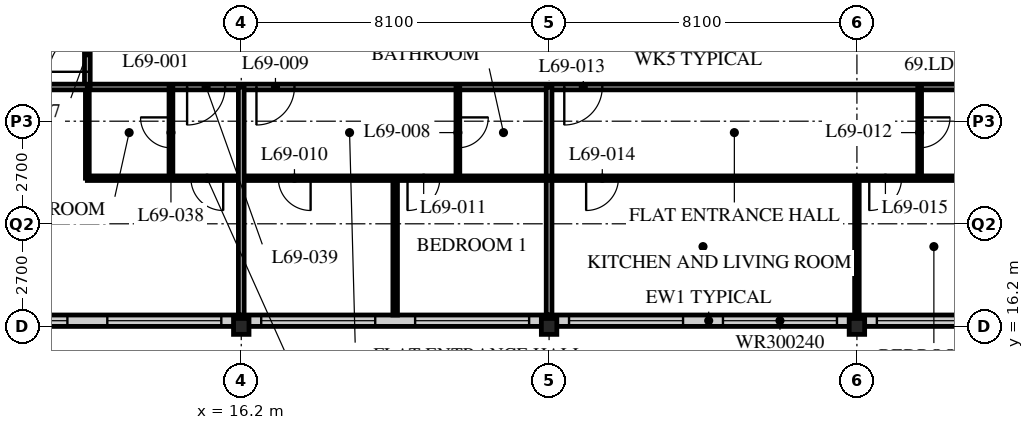
"""IFC4 building model, lengths in metres.
Left out: names, types, materials, properties, quantities, classifications, styles, units other than length and angle.
Written with IfcOpenShell. Run it as: python <this file> out.ifc"""

import sys

from ifc_helpers import new_model, si_unit, direction, frame, frame_2d, origin, origin_2d, place, context, subcontext, project, spatial, rectangle, i_section, extrude, element, fill, save


model = new_model("IFC4")
c1 = context("Model", 3, precision=1e-05, world=origin(), true_north=direction((0.0, 1.0)))
c2 = subcontext(c1, "Body", "Model", "MODEL_VIEW")
j1 = project(units=[si_unit("LENGTHUNIT", "METRE"), si_unit("PLANEANGLEUNIT", "RADIAN")], contexts=[c1])
p1 = place(None, origin())
s1 = spatial("IfcSite", under=j1, at=p1, CompositionType="ELEMENT")
p2 = place(p1, origin())
s2 = spatial("IfcBuilding", under=s1, at=p2, CompositionType="ELEMENT")
p3 = place(p2, frame((0.0, 0.0, 269.7)))
s3 = spatial("IfcBuildingStorey", under=s2, at=p3, CompositionType="ELEMENT", Elevation=269.7)
for number, where, z_axis, x_axis in (
    (1, (16.2, 16.2, 0.0), (0.0, 0.0, 1.0), (1.0, 0.0, 0.0)),
    (2, (24.3, 16.2, 0.0), (0.0, 0.0, 1.0), (1.0, 0.0, 0.0)),
    (3, (32.4, 16.2, 0.0), (0.0, 0.0, 1.0), (1.0, 0.0, 0.0)),
):
    element("IfcColumn", number, at=place(p3, frame(where, z_axis=z_axis, x_axis=x_axis)), inside=s3, PredefinedType="COLUMN", context=c2, shape_type="SweptSolid", body=[
        extrude(i_section(OverallWidth=0.407, OverallDepth=0.419, WebThickness=0.031, FlangeThickness=0.049, FilletRadius=0.015, at=origin_2d()), origin(), (0.0, 0.0, 1.0), 3.9),
    ])
p4 = place(p3, frame((8.4, 16.35, 0.0), z_axis=(0.0, 0.0, 1.0), x_axis=(1.0, 0.0, 0.0)))
e4 = element("IfcWall", 4, at=p4, inside=s3, PredefinedType="SOLIDWALL", context=c2, shape_type="SweptSolid", body=[
    extrude(rectangle(XDim=40.2, YDim=0.3, at=frame_2d((20.1, 0.0))), origin(), (0.0, 0.0, 1.0), 3.69),
])
p5 = place(p4, frame((0.225, 0.0, 0.6)))
e5 = element("IfcOpeningElement", 5, at=p5, cuts=e4, PredefinedType="OPENING", context=c2, shape_type="SweptSolid", body=[
    extrude(rectangle(XDim=3.0, YDim=2.4, at=frame_2d((1.5, 1.2))), frame((0.0, 0.16, 0.0), z_axis=(0.0, -1.0, 0.0), x_axis=(1.0, 0.0, 0.0)), (0.0, 0.0, 1.0), 0.32),
])
p6 = place(p4, frame((4.275, 0.0, 0.6)))
e6 = element("IfcOpeningElement", 6, at=p6, cuts=e4, PredefinedType="OPENING", context=c2, shape_type="SweptSolid", body=[
    extrude(rectangle(XDim=3.0, YDim=2.4, at=frame_2d((1.5, 1.2))), frame((0.0, 0.16, 0.0), z_axis=(0.0, -1.0, 0.0), x_axis=(1.0, 0.0, 0.0)), (0.0, 0.0, 1.0), 0.32),
])
p7 = place(p4, frame((8.325, 0.0, 0.6)))
e7 = element("IfcOpeningElement", 7, at=p7, cuts=e4, PredefinedType="OPENING", context=c2, shape_type="SweptSolid", body=[
    extrude(rectangle(XDim=3.0, YDim=2.4, at=frame_2d((1.5, 1.2))), frame((0.0, 0.16, 0.0), z_axis=(0.0, -1.0, 0.0), x_axis=(1.0, 0.0, 0.0)), (0.0, 0.0, 1.0), 0.32),
])
p8 = place(p4, frame((12.375, 0.0, 0.6)))
e8 = element("IfcOpeningElement", 8, at=p8, cuts=e4, PredefinedType="OPENING", context=c2, shape_type="SweptSolid", body=[
    extrude(rectangle(XDim=3.0, YDim=2.4, at=frame_2d((1.5, 1.2))), frame((0.0, 0.16, 0.0), z_axis=(0.0, -1.0, 0.0), x_axis=(1.0, 0.0, 0.0)), (0.0, 0.0, 1.0), 0.32),
])
p9 = place(p4, frame((16.425, 0.0, 0.6)))
e9 = element("IfcOpeningElement", 9, at=p9, cuts=e4, PredefinedType="OPENING", context=c2, shape_type="SweptSolid", body=[
    extrude(rectangle(XDim=3.0, YDim=2.4, at=frame_2d((1.5, 1.2))), frame((0.0, 0.16, 0.0), z_axis=(0.0, -1.0, 0.0), x_axis=(1.0, 0.0, 0.0)), (0.0, 0.0, 1.0), 0.32),
])
p10 = place(p4, frame((20.475, 0.0, 0.6)))
e10 = element("IfcOpeningElement", 10, at=p10, cuts=e4, PredefinedType="OPENING", context=c2, shape_type="SweptSolid", body=[
    extrude(rectangle(XDim=3.0, YDim=2.4, at=frame_2d((1.5, 1.2))), frame((0.0, 0.16, 0.0), z_axis=(0.0, -1.0, 0.0), x_axis=(1.0, 0.0, 0.0)), (0.0, 0.0, 1.0), 0.32),
])
p11 = place(p4, frame((24.525, 0.0, 0.6)))
e11 = element("IfcOpeningElement", 11, at=p11, cuts=e4, PredefinedType="OPENING", context=c2, shape_type="SweptSolid", body=[
    extrude(rectangle(XDim=3.0, YDim=2.4, at=frame_2d((1.5, 1.2))), frame((0.0, 0.16, 0.0), z_axis=(0.0, -1.0, 0.0), x_axis=(1.0, 0.0, 0.0)), (0.0, 0.0, 1.0), 0.32),
])
p12 = place(p4, frame((28.575, 0.0, 0.6)))
e12 = element("IfcOpeningElement", 12, at=p12, cuts=e4, PredefinedType="OPENING", context=c2, shape_type="SweptSolid", body=[
    extrude(rectangle(XDim=3.0, YDim=2.4, at=frame_2d((1.5, 1.2))), frame((0.0, 0.16, 0.0), z_axis=(0.0, -1.0, 0.0), x_axis=(1.0, 0.0, 0.0)), (0.0, 0.0, 1.0), 0.32),
])
p13 = place(p4, frame((32.625, 0.0, 0.6)))
e13 = element("IfcOpeningElement", 13, at=p13, cuts=e4, PredefinedType="OPENING", context=c2, shape_type="SweptSolid", body=[
    extrude(rectangle(XDim=3.0, YDim=2.4, at=frame_2d((1.5, 1.2))), frame((0.0, 0.16, 0.0), z_axis=(0.0, -1.0, 0.0), x_axis=(1.0, 0.0, 0.0)), (0.0, 0.0, 1.0), 0.32),
])
p14 = place(p4, frame((36.675, 0.0, 0.6)))
e14 = element("IfcOpeningElement", 14, at=p14, cuts=e4, PredefinedType="OPENING", context=c2, shape_type="SweptSolid", body=[
    extrude(rectangle(XDim=3.0, YDim=2.4, at=frame_2d((1.5, 1.2))), frame((0.0, 0.16, 0.0), z_axis=(0.0, -1.0, 0.0), x_axis=(1.0, 0.0, 0.0)), (0.0, 0.0, 1.0), 0.32),
])
p15 = place(p3, frame((12.15, 22.5, 0.0), z_axis=(0.0, 0.0, 1.0), x_axis=(1.0, 0.0, 0.0)))
e15 = element("IfcWall", 15, at=p15, inside=s3, PredefinedType="PARTITIONING", context=c2, shape_type="SweptSolid", body=[
    extrude(rectangle(XDim=24.3, YDim=0.15, at=frame_2d((12.15, 0.0))), origin(), (0.0, 0.0, 1.0), 3.69),
])
p16 = place(p15, frame((4.45, 0.0, 0.0)))
e16 = element("IfcOpeningElement", 16, at=p16, cuts=e15, PredefinedType="OPENING", context=c2, shape_type="SweptSolid", body=[
    extrude(rectangle(XDim=1.0, YDim=2.1, at=frame_2d((0.5, 1.05))), frame((0.0, 0.085, 0.0), z_axis=(0.0, -1.0, 0.0), x_axis=(1.0, 0.0, 0.0)), (0.0, 0.0, 1.0), 0.17),
])
p17 = place(p15, frame((12.55, 0.0, 0.0)))
e17 = element("IfcOpeningElement", 17, at=p17, cuts=e15, PredefinedType="OPENING", context=c2, shape_type="SweptSolid", body=[
    extrude(rectangle(XDim=1.0, YDim=2.1, at=frame_2d((0.5, 1.05))), frame((0.0, 0.085, 0.0), z_axis=(0.0, -1.0, 0.0), x_axis=(1.0, 0.0, 0.0)), (0.0, 0.0, 1.0), 0.17),
])
p18 = place(p15, frame((2.625, 0.0, 0.0)))
e18 = element("IfcOpeningElement", 18, at=p18, cuts=e15, PredefinedType="OPENING", context=c2, shape_type="SweptSolid", body=[
    extrude(rectangle(XDim=1.0, YDim=2.1, at=frame_2d((0.5, 1.05))), frame((0.0, 0.085, 0.0), z_axis=(0.0, -1.0, 0.0), x_axis=(1.0, 0.0, 0.0)), (0.0, 0.0, 1.0), 0.17),
])
p19 = place(p3, frame((12.15, 22.5, 0.0), z_axis=(0.0, 0.0, 1.0), x_axis=(0.0, 1.0, 0.0)))
e19 = element("IfcWall", 19, at=p19, inside=s3, PredefinedType="PARTITIONING", context=c2, shape_type="SweptSolid", body=[
    extrude(rectangle(XDim=30.15, YDim=0.15, at=frame_2d((15.075, 0.0))), origin(), (0.0, 0.0, 1.0), 3.69),
])
p20 = place(p19, frame((0.4, 0.0, 0.0)))
e20 = element("IfcOpeningElement", 20, at=p20, cuts=e19, PredefinedType="OPENING", context=c2, shape_type="SweptSolid", body=[
    extrude(rectangle(XDim=1.0, YDim=2.1, at=frame_2d((0.5, 1.05))), frame((0.0, 0.085, 0.0), z_axis=(0.0, -1.0, 0.0), x_axis=(1.0, 0.0, 0.0)), (0.0, 0.0, 1.0), 0.17),
])
p21 = place(p19, frame((18.4, 0.0, 0.0)))
e21 = element("IfcOpeningElement", 21, at=p21, cuts=e19, PredefinedType="OPENING", context=c2, shape_type="SweptSolid", body=[
    extrude(rectangle(XDim=1.0, YDim=2.1, at=frame_2d((0.5, 1.05))), frame((0.0, 0.085, 0.0), z_axis=(0.0, -1.0, 0.0), x_axis=(1.0, 0.0, 0.0)), (0.0, 0.0, 1.0), 0.17),
])
p22 = place(p19, frame((28.45, 0.0, 0.0)))
e22 = element("IfcOpeningElement", 22, at=p22, cuts=e19, PredefinedType="OPENING", context=c2, shape_type="SweptSolid", body=[
    extrude(rectangle(XDim=1.0, YDim=2.1, at=frame_2d((0.5, 1.05))), frame((0.0, 0.085, 0.0), z_axis=(0.0, -1.0, 0.0), x_axis=(1.0, 0.0, 0.0)), (0.0, 0.0, 1.0), 0.17),
])
p23 = place(p3, frame((21.9, 22.5, 0.0), z_axis=(0.0, 0.0, 1.0), x_axis=(0.0, -1.0, 0.0)))
e23 = element("IfcWall", 23, at=p23, inside=s3, PredefinedType="PARTITIONING", context=c2, shape_type="SweptSolid", body=[
    extrude(rectangle(XDim=2.4, YDim=0.1, at=frame_2d((1.2, 0.0))), origin(), (0.0, 0.0, 1.0), 3.69),
])
p24 = place(p23, frame((0.8, 0.0, 0.0)))
e24 = element("IfcOpeningElement", 24, at=p24, cuts=e23, PredefinedType="OPENING", context=c2, shape_type="SweptSolid", body=[
    extrude(rectangle(XDim=0.8, YDim=2.1, at=frame_2d((0.4, 1.05))), frame((0.0, 0.06, 0.0), z_axis=(0.0, -1.0, 0.0), x_axis=(1.0, 0.0, 0.0)), (0.0, 0.0, 1.0), 0.12),
])
p25 = place(p3, frame((20.25, 20.1, 0.0), z_axis=(0.0, 0.0, 1.0), x_axis=(0.0, -1.0, 0.0)))
e25 = element("IfcWall", 25, at=p25, inside=s3, PredefinedType="PARTITIONING", context=c2, shape_type="SweptSolid", body=[
    extrude(rectangle(XDim=3.6, YDim=0.12, at=frame_2d((1.8, 0.0))), origin(), (0.0, 0.0, 1.0), 3.69),
])
p26 = place(p3, frame((24.3, 22.5, 0.0), z_axis=(0.0, 0.0, 1.0), x_axis=(0.0, -1.0, 0.0)))
e26 = element("IfcWall", 26, at=p26, inside=s3, PredefinedType="PARTITIONING", context=c2, shape_type="SweptSolid", body=[
    extrude(rectangle(XDim=6.0, YDim=0.15, at=frame_2d((3.0, 0.0))), origin(), (0.0, 0.0, 1.0), 3.078),
])
p27 = place(p3, frame((34.05, 22.5, 0.0), z_axis=(0.0, 0.0, 1.0), x_axis=(0.0, -1.0, 0.0)))
e27 = element("IfcWall", 27, at=p27, inside=s3, PredefinedType="PARTITIONING", context=c2, shape_type="SweptSolid", body=[
    extrude(rectangle(XDim=2.4, YDim=0.1, at=frame_2d((1.2, 0.0))), origin(), (0.0, 0.0, 1.0), 3.69),
])
p28 = place(p27, frame((0.8, 0.0, 0.0)))
e28 = element("IfcOpeningElement", 28, at=p28, cuts=e27, PredefinedType="OPENING", context=c2, shape_type="SweptSolid", body=[
    extrude(rectangle(XDim=0.8, YDim=2.1, at=frame_2d((0.4, 1.05))), frame((0.0, 0.06, 0.0), z_axis=(0.0, -1.0, 0.0), x_axis=(1.0, 0.0, 0.0)), (0.0, 0.0, 1.0), 0.12),
])
p29 = place(p3, frame((32.4, 20.1, 0.0), z_axis=(0.0, 0.0, 1.0), x_axis=(0.0, -1.0, 0.0)))
e29 = element("IfcWall", 29, at=p29, inside=s3, PredefinedType="PARTITIONING", context=c2, shape_type="SweptSolid", body=[
    extrude(rectangle(XDim=3.6, YDim=0.12, at=frame_2d((1.8, 0.0))), origin(), (0.0, 0.0, 1.0), 3.078),
])
p30 = place(p3, frame((12.15, 20.1, 0.0), z_axis=(0.0, 0.0, 1.0), x_axis=(1.0, 0.0, 0.0)))
e30 = element("IfcWall", 30, at=p30, inside=s3, PredefinedType="PARTITIONING", context=c2, shape_type="SweptSolid", body=[
    extrude(rectangle(XDim=24.3, YDim=0.12, at=frame_2d((12.15, 0.0))), origin(), (0.0, 0.0, 1.0), 3.69),
])
p31 = place(p30, frame((5.025, 0.0, 0.0)))
e31 = element("IfcOpeningElement", 31, at=p31, cuts=e30, PredefinedType="OPENING", context=c2, shape_type="SweptSolid", body=[
    extrude(rectangle(XDim=0.85, YDim=2.1, at=frame_2d((0.425, 1.05))), frame((0.0, 0.07, 0.0), z_axis=(0.0, -1.0, 0.0), x_axis=(1.0, 0.0, 0.0)), (0.0, 0.0, 1.0), 0.14),
])
p32 = place(p30, frame((8.425, 0.0, 0.0)))
e32 = element("IfcOpeningElement", 32, at=p32, cuts=e30, PredefinedType="OPENING", context=c2, shape_type="SweptSolid", body=[
    extrude(rectangle(XDim=0.85, YDim=2.1, at=frame_2d((0.425, 1.05))), frame((0.0, 0.07, 0.0), z_axis=(0.0, -1.0, 0.0), x_axis=(1.0, 0.0, 0.0)), (0.0, 0.0, 1.0), 0.14),
])
p33 = place(p30, frame((13.125, 0.0, 0.0)))
e33 = element("IfcOpeningElement", 33, at=p33, cuts=e30, PredefinedType="OPENING", context=c2, shape_type="SweptSolid", body=[
    extrude(rectangle(XDim=0.85, YDim=2.1, at=frame_2d((0.425, 1.05))), frame((0.0, 0.07, 0.0), z_axis=(0.0, -1.0, 0.0), x_axis=(1.0, 0.0, 0.0)), (0.0, 0.0, 1.0), 0.14),
])
p34 = place(p30, frame((20.575, 0.0, 0.0)))
e34 = element("IfcOpeningElement", 34, at=p34, cuts=e30, PredefinedType="OPENING", context=c2, shape_type="SweptSolid", body=[
    extrude(rectangle(XDim=0.85, YDim=2.1, at=frame_2d((0.425, 1.05))), frame((0.0, 0.07, 0.0), z_axis=(0.0, -1.0, 0.0), x_axis=(1.0, 0.0, 0.0)), (0.0, 0.0, 1.0), 0.14),
])
p35 = place(p30, frame((2.725, 0.0, 0.0)))
e35 = element("IfcOpeningElement", 35, at=p35, cuts=e30, PredefinedType="OPENING", context=c2, shape_type="SweptSolid", body=[
    extrude(rectangle(XDim=0.85, YDim=2.1, at=frame_2d((0.425, 1.05))), frame((0.0, 0.07, 0.0), z_axis=(0.0, -1.0, 0.0), x_axis=(1.0, 0.0, 0.0)), (0.0, 0.0, 1.0), 0.14),
])
p36 = place(p3, frame((14.35, 22.5, 0.0), z_axis=(0.0, 0.0, 1.0), x_axis=(0.0, -1.0, 0.0)))
e36 = element("IfcWall", 36, at=p36, inside=s3, PredefinedType="PARTITIONING", context=c2, shape_type="SweptSolid", body=[
    extrude(rectangle(XDim=2.4, YDim=0.1, at=frame_2d((1.2, 0.0))), origin(), (0.0, 0.0, 1.0), 3.69),
])
p37 = place(p36, frame((0.8, 0.0, 0.0)))
e37 = element("IfcOpeningElement", 37, at=p37, cuts=e36, PredefinedType="OPENING", context=c2, shape_type="SweptSolid", body=[
    extrude(rectangle(XDim=0.8, YDim=2.1, at=frame_2d((0.4, 1.05))), frame((0.0, 0.06, 0.0), z_axis=(0.0, -1.0, 0.0), x_axis=(1.0, 0.0, 0.0)), (0.0, 0.0, 1.0), 0.12),
])
p38 = place(p3, frame((12.15, 22.5, 0.0), z_axis=(0.0, 0.0, 1.0), x_axis=(0.0, -1.0, 0.0)))
e38 = element("IfcWall", 38, at=p38, inside=s3, PredefinedType="PARTITIONING", context=c2, shape_type="SweptSolid", body=[
    extrude(rectangle(XDim=2.4, YDim=0.1, at=frame_2d((1.2, 0.0))), origin(), (0.0, 0.0, 1.0), 3.69),
])
p39 = place(p3, frame((4.35, 22.5, 0.0), z_axis=(0.0, 0.0, 1.0), x_axis=(1.0, 0.0, 0.0)))
e39 = element("IfcWall", 39, at=p39, inside=s3, PredefinedType="PARTITIONING", context=c2, shape_type="SweptSolid", body=[
    extrude(rectangle(XDim=7.8, YDim=0.15, at=frame_2d((3.9, 0.0))), origin(), (0.0, 0.0, 1.0), 3.69),
])
p40 = place(p3, frame((16.2, 22.5, 0.0), z_axis=(0.0, 0.0, 1.0), x_axis=(0.0, -1.0, 0.0)))
e40 = element("IfcWall", 40, at=p40, inside=s3, PredefinedType="PARTITIONING", context=c2, shape_type="SweptSolid", body=[
    extrude(rectangle(XDim=6.0, YDim=0.15, at=frame_2d((3.0, 0.0))), origin(), (0.0, 0.0, 1.0), 3.078),
])
p41 = place(p5, origin())
e41 = element("IfcWindow", 41, at=p41, inside=s3, PartitioningType="SINGLE_PANEL", PredefinedType="WINDOW", context=c2, shape_type="SweptSolid", body=[
    extrude(rectangle(XDim=3.0, YDim=2.4, at=frame_2d((1.5, 1.2))), frame((0.0, 0.03, 0.0), z_axis=(0.0, -1.0, 0.0), x_axis=(1.0, 0.0, 0.0)), (0.0, 0.0, 1.0), 0.06),
])
fill(e5, e41)
p42 = place(p6, origin())
e42 = element("IfcWindow", 42, at=p42, inside=s3, PartitioningType="SINGLE_PANEL", PredefinedType="WINDOW", context=c2, shape_type="SweptSolid", body=[
    extrude(rectangle(XDim=3.0, YDim=2.4, at=frame_2d((1.5, 1.2))), frame((0.0, 0.03, 0.0), z_axis=(0.0, -1.0, 0.0), x_axis=(1.0, 0.0, 0.0)), (0.0, 0.0, 1.0), 0.06),
])
fill(e6, e42)
p43 = place(p7, origin())
e43 = element("IfcWindow", 43, at=p43, inside=s3, PartitioningType="SINGLE_PANEL", PredefinedType="WINDOW", context=c2, shape_type="SweptSolid", body=[
    extrude(rectangle(XDim=3.0, YDim=2.4, at=frame_2d((1.5, 1.2))), frame((0.0, 0.03, 0.0), z_axis=(0.0, -1.0, 0.0), x_axis=(1.0, 0.0, 0.0)), (0.0, 0.0, 1.0), 0.06),
])
fill(e7, e43)
p44 = place(p8, origin())
e44 = element("IfcWindow", 44, at=p44, inside=s3, PartitioningType="SINGLE_PANEL", PredefinedType="WINDOW", context=c2, shape_type="SweptSolid", body=[
    extrude(rectangle(XDim=3.0, YDim=2.4, at=frame_2d((1.5, 1.2))), frame((0.0, 0.03, 0.0), z_axis=(0.0, -1.0, 0.0), x_axis=(1.0, 0.0, 0.0)), (0.0, 0.0, 1.0), 0.06),
])
fill(e8, e44)
p45 = place(p9, origin())
e45 = element("IfcWindow", 45, at=p45, inside=s3, PartitioningType="SINGLE_PANEL", PredefinedType="WINDOW", context=c2, shape_type="SweptSolid", body=[
    extrude(rectangle(XDim=3.0, YDim=2.4, at=frame_2d((1.5, 1.2))), frame((0.0, 0.03, 0.0), z_axis=(0.0, -1.0, 0.0), x_axis=(1.0, 0.0, 0.0)), (0.0, 0.0, 1.0), 0.06),
])
fill(e9, e45)
p46 = place(p10, origin())
e46 = element("IfcWindow", 46, at=p46, inside=s3, PartitioningType="SINGLE_PANEL", PredefinedType="WINDOW", context=c2, shape_type="SweptSolid", body=[
    extrude(rectangle(XDim=3.0, YDim=2.4, at=frame_2d((1.5, 1.2))), frame((0.0, 0.03, 0.0), z_axis=(0.0, -1.0, 0.0), x_axis=(1.0, 0.0, 0.0)), (0.0, 0.0, 1.0), 0.06),
])
fill(e10, e46)
p47 = place(p11, origin())
e47 = element("IfcWindow", 47, at=p47, inside=s3, PartitioningType="SINGLE_PANEL", PredefinedType="WINDOW", context=c2, shape_type="SweptSolid", body=[
    extrude(rectangle(XDim=3.0, YDim=2.4, at=frame_2d((1.5, 1.2))), frame((0.0, 0.03, 0.0), z_axis=(0.0, -1.0, 0.0), x_axis=(1.0, 0.0, 0.0)), (0.0, 0.0, 1.0), 0.06),
])
fill(e11, e47)
p48 = place(p24, origin())
e48 = element("IfcDoor", 48, at=p48, inside=s3, OperationType="SINGLE_SWING_LEFT", PredefinedType="DOOR", context=c2, shape_type="SweptSolid", body=[
    extrude(rectangle(XDim=0.8, YDim=2.1, at=frame_2d((0.4, 1.05))), frame((0.0, 0.025, 0.0), z_axis=(0.0, -1.0, 0.0), x_axis=(1.0, 0.0, 0.0)), (0.0, 0.0, 1.0), 0.05),
])
fill(e24, e48)
p49 = place(p16, origin())
e49 = element("IfcDoor", 49, at=p49, inside=s3, OperationType="SINGLE_SWING_RIGHT", PredefinedType="DOOR", context=c2, shape_type="SweptSolid", body=[
    extrude(rectangle(XDim=1.0, YDim=2.1, at=frame_2d((0.5, 1.05))), frame((0.0, 0.025, 0.0), z_axis=(0.0, -1.0, 0.0), x_axis=(1.0, 0.0, 0.0)), (0.0, 0.0, 1.0), 0.05),
])
fill(e16, e49)
p50 = place(p31, origin())
e50 = element("IfcDoor", 50, at=p50, inside=s3, OperationType="SINGLE_SWING_LEFT", PredefinedType="DOOR", context=c2, shape_type="SweptSolid", body=[
    extrude(rectangle(XDim=0.85, YDim=2.1, at=frame_2d((0.425, 1.05))), frame((0.0, 0.025, 0.0), z_axis=(0.0, -1.0, 0.0), x_axis=(1.0, 0.0, 0.0)), (0.0, 0.0, 1.0), 0.05),
])
fill(e31, e50)
p51 = place(p32, origin())
e51 = element("IfcDoor", 51, at=p51, inside=s3, OperationType="SINGLE_SWING_RIGHT", PredefinedType="DOOR", context=c2, shape_type="SweptSolid", body=[
    extrude(rectangle(XDim=0.85, YDim=2.1, at=frame_2d((0.425, 1.05))), frame((0.0, 0.025, 0.0), z_axis=(0.0, -1.0, 0.0), x_axis=(1.0, 0.0, 0.0)), (0.0, 0.0, 1.0), 0.05),
])
fill(e32, e51)
p52 = place(p28, origin())
e52 = element("IfcDoor", 52, at=p52, inside=s3, OperationType="SINGLE_SWING_LEFT", PredefinedType="DOOR", context=c2, shape_type="SweptSolid", body=[
    extrude(rectangle(XDim=0.8, YDim=2.1, at=frame_2d((0.4, 1.05))), frame((0.0, 0.025, 0.0), z_axis=(0.0, -1.0, 0.0), x_axis=(1.0, 0.0, 0.0)), (0.0, 0.0, 1.0), 0.05),
])
fill(e28, e52)
p53 = place(p17, origin())
e53 = element("IfcDoor", 53, at=p53, inside=s3, OperationType="SINGLE_SWING_RIGHT", PredefinedType="DOOR", context=c2, shape_type="SweptSolid", body=[
    extrude(rectangle(XDim=1.0, YDim=2.1, at=frame_2d((0.5, 1.05))), frame((0.0, 0.025, 0.0), z_axis=(0.0, -1.0, 0.0), x_axis=(1.0, 0.0, 0.0)), (0.0, 0.0, 1.0), 0.05),
])
fill(e17, e53)
p54 = place(p33, origin())
e54 = element("IfcDoor", 54, at=p54, inside=s3, OperationType="SINGLE_SWING_RIGHT", PredefinedType="DOOR", context=c2, shape_type="SweptSolid", body=[
    extrude(rectangle(XDim=0.85, YDim=2.1, at=frame_2d((0.425, 1.05))), frame((0.0, 0.025, 0.0), z_axis=(0.0, -1.0, 0.0), x_axis=(1.0, 0.0, 0.0)), (0.0, 0.0, 1.0), 0.05),
])
fill(e33, e54)
p55 = place(p34, origin())
e55 = element("IfcDoor", 55, at=p55, inside=s3, OperationType="SINGLE_SWING_RIGHT", PredefinedType="DOOR", context=c2, shape_type="SweptSolid", body=[
    extrude(rectangle(XDim=0.85, YDim=2.1, at=frame_2d((0.425, 1.05))), frame((0.0, 0.025, 0.0), z_axis=(0.0, -1.0, 0.0), x_axis=(1.0, 0.0, 0.0)), (0.0, 0.0, 1.0), 0.05),
])
fill(e34, e55)
p56 = place(p20, origin())
e56 = element("IfcDoor", 56, at=p56, inside=s3, OperationType="SINGLE_SWING_LEFT", PredefinedType="DOOR", context=c2, shape_type="SweptSolid", body=[
    extrude(rectangle(XDim=1.0, YDim=2.1, at=frame_2d((0.5, 1.05))), frame((0.0, 0.025, 0.0), z_axis=(0.0, -1.0, 0.0), x_axis=(1.0, 0.0, 0.0)), (0.0, 0.0, 1.0), 0.05),
])
fill(e20, e56)
p57 = place(p37, origin())
e57 = element("IfcDoor", 57, at=p57, inside=s3, OperationType="SINGLE_SWING_RIGHT", PredefinedType="DOOR", context=c2, shape_type="SweptSolid", body=[
    extrude(rectangle(XDim=0.8, YDim=2.1, at=frame_2d((0.4, 1.05))), frame((0.0, 0.025, 0.0), z_axis=(0.0, -1.0, 0.0), x_axis=(1.0, 0.0, 0.0)), (0.0, 0.0, 1.0), 0.05),
])
fill(e37, e57)
p58 = place(p18, origin())
e58 = element("IfcDoor", 58, at=p58, inside=s3, OperationType="SINGLE_SWING_RIGHT", PredefinedType="DOOR", context=c2, shape_type="SweptSolid", body=[
    extrude(rectangle(XDim=1.0, YDim=2.1, at=frame_2d((0.5, 1.05))), frame((0.0, 0.025, 0.0), z_axis=(0.0, -1.0, 0.0), x_axis=(1.0, 0.0, 0.0)), (0.0, 0.0, 1.0), 0.05),
])
fill(e18, e58)
p59 = place(p35, origin())
e59 = element("IfcDoor", 59, at=p59, inside=s3, OperationType="SINGLE_SWING_LEFT", PredefinedType="DOOR", context=c2, shape_type="SweptSolid", body=[
    extrude(rectangle(XDim=0.85, YDim=2.1, at=frame_2d((0.425, 1.05))), frame((0.0, 0.025, 0.0), z_axis=(0.0, -1.0, 0.0), x_axis=(1.0, 0.0, 0.0)), (0.0, 0.0, 1.0), 0.05),
])
fill(e35, e59)
save(model, sys.argv[1])
